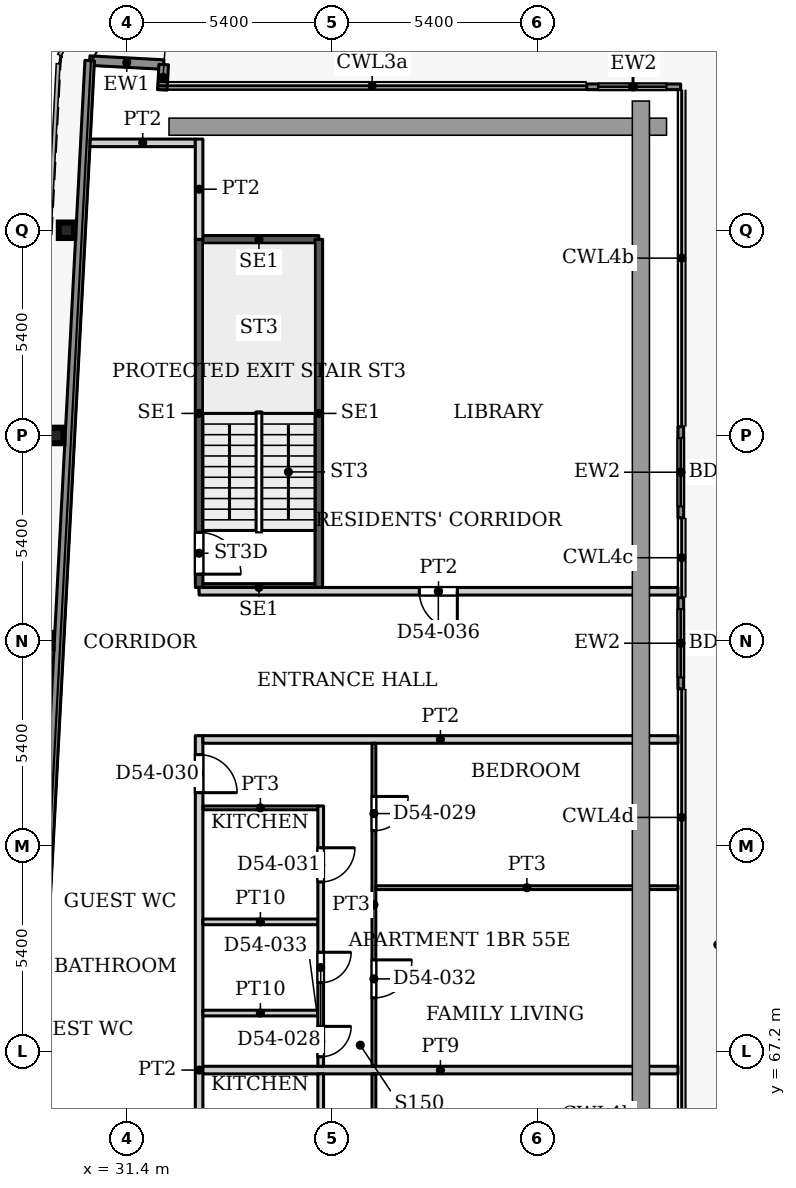
"""IFC4 building model, lengths in metres.
Left out: names, types, materials, properties, quantities, classifications, styles, units other than length and angle.
Written with IfcOpenShell. Run it as: python <this file> out.ifc"""

import sys

from ifc_helpers import new_model, si_unit, direction, frame, frame_2d, origin, origin_2d, place, context, subcontext, project, spatial, rectangle, i_section, extrude, source, transform, mapped, element, fill, save


model = new_model("IFC4")
c1 = context("Model", 3, precision=1e-05, world=origin(), true_north=direction((0.0, 1.0)))
c2 = subcontext(c1, "Body", "Model", "MODEL_VIEW")
j1 = project(units=[si_unit("LENGTHUNIT", "METRE"), si_unit("PLANEANGLEUNIT", "RADIAN")], contexts=[c1])
p1 = place(None, origin())
s1 = spatial("IfcSite", under=j1, at=p1, CompositionType="ELEMENT")
p2 = place(p1, origin())
s2 = spatial("IfcBuilding", under=s1, at=p2, CompositionType="ELEMENT")
p3 = place(p2, frame((0.0, 0.0, 235.7)))
s3 = spatial("IfcBuildingStorey", under=s2, at=p3, CompositionType="ELEMENT", Elevation=235.7)
for number, where, z_axis, x_axis in (
    (1, (29.243, 78.0, 0.0), (0.0, 0.0, 1.0), (1.0, 0.0, 0.0)),
    (2, (29.527, 83.4, 0.0), (0.0, 0.0, 1.0), (1.0, 0.0, 0.0)),
    (3, (29.811, 88.8, 0.0), (0.0, 0.0, 1.0), (1.0, 0.0, 0.0)),
):
    element("IfcColumn", number, at=place(p3, frame(where, z_axis=z_axis, x_axis=x_axis)), inside=s3, PredefinedType="COLUMN", context=c2, shape_type="SweptSolid", body=[
        extrude(i_section(OverallWidth=0.404, OverallDepth=0.407, WebThickness=0.027, FlangeThickness=0.044, FilletRadius=0.012, at=origin_2d()), origin(), (0.0, 0.0, 1.0), 3.9),
    ])
p4 = place(p3, frame((30.421, 93.264, 0.0), z_axis=(0.0, 0.0, 1.0), x_axis=(0.998577785791, -0.053314216913, 0.0)))
e4 = element("IfcWall", 4, at=p4, inside=s3, PredefinedType="SOLIDWALL", context=c2, shape_type="SweptSolid", body=[
    extrude(rectangle(XDim=1.951, YDim=0.25, at=frame_2d((0.975, 0.0))), origin(), (0.0, 0.0, 1.0), 3.75),
])
p5 = place(p3, frame((32.369, 93.16, 0.0), z_axis=(0.0, 0.0, 1.0), x_axis=(-0.053729014033, -0.998555553312, 0.0)))
e5 = element("IfcWall", 5, at=p5, inside=s3, PredefinedType="SOLIDWALL", context=c2, shape_type="SweptSolid", body=[
    extrude(rectangle(XDim=0.668, YDim=0.25, at=frame_2d((0.334, 0.0))), origin(), (0.0, 0.0, 1.0), 3.75),
])
p6 = place(p3, frame((43.5, 92.575, 0.0), z_axis=(0.0, 0.0, 1.0), x_axis=(1.0, 0.0, 0.0)))
e6 = element("IfcWall", 6, at=p6, inside=s3, PredefinedType="SOLIDWALL", context=c2, shape_type="SweptSolid", body=[
    extrude(rectangle(XDim=2.471, YDim=0.15, at=frame_2d((1.235, 0.0))), origin(), (0.0, 0.0, 1.0), 3.75),
])
p7 = place(p6, frame((0.3, 0.0, 0.0)))
e7 = element("IfcOpeningElement", 7, at=p7, cuts=e6, PredefinedType="OPENING", context=c2, shape_type="SweptSolid", body=[
    extrude(rectangle(XDim=1.8, YDim=2.4, at=frame_2d((0.9, 1.2))), frame((0.0, 0.085, 0.0), z_axis=(0.0, -1.0, 0.0), x_axis=(1.0, 0.0, 0.0)), (0.0, 0.0, 1.0), 0.17),
])
p8 = place(p3, frame((45.975, 83.632, 0.0), z_axis=(0.0, 0.0, 1.0), x_axis=(0.0, -1.0, 0.0)))
e8 = element("IfcWall", 8, at=p8, inside=s3, PredefinedType="SOLIDWALL", context=c2, shape_type="SweptSolid", body=[
    extrude(rectangle(XDim=2.399, YDim=0.15, at=frame_2d((1.2, 0.0))), origin(), (0.0, 0.0, 1.0), 3.75),
])
p9 = place(p8, frame((0.3, 0.0, 0.0)))
e9 = element("IfcOpeningElement", 9, at=p9, cuts=e8, PredefinedType="OPENING", context=c2, shape_type="SweptSolid", body=[
    extrude(rectangle(XDim=1.8, YDim=2.4, at=frame_2d((0.9, 1.2))), frame((0.0, 0.085, 0.0), z_axis=(0.0, -1.0, 0.0), x_axis=(1.0, 0.0, 0.0)), (0.0, 0.0, 1.0), 0.17),
])
p10 = place(p3, frame((45.975, 79.132, 0.0), z_axis=(0.0, 0.0, 1.0), x_axis=(0.0, -1.0, 0.0)))
e10 = element("IfcWall", 10, at=p10, inside=s3, PredefinedType="SOLIDWALL", context=c2, shape_type="SweptSolid", body=[
    extrude(rectangle(XDim=2.399, YDim=0.15, at=frame_2d((1.2, 0.0))), origin(), (0.0, 0.0, 1.0), 3.75),
])
p11 = place(p10, frame((0.3, 0.0, 0.0)))
e11 = element("IfcOpeningElement", 11, at=p11, cuts=e10, PredefinedType="OPENING", context=c2, shape_type="SweptSolid", body=[
    extrude(rectangle(XDim=1.8, YDim=2.4, at=frame_2d((0.9, 1.2))), frame((0.0, 0.085, 0.0), z_axis=(0.0, -1.0, 0.0), x_axis=(1.0, 0.0, 0.0)), (0.0, 0.0, 1.0), 0.17),
])
p12 = place(p3, frame((27.195, 31.969, 0.0), z_axis=(0.0, 0.0, 1.0), x_axis=(0.052555284099, 0.998618016117, 0.0)))
e12 = element("IfcWall", 12, at=p12, inside=s3, PredefinedType="SOLIDWALL", context=c2, shape_type="SweptSolid", body=[
    extrude(rectangle(XDim=61.38, YDim=0.25, at=frame_2d((30.69, 0.0))), origin(), (0.0, 0.0, 1.0), 3.75),
])
for number, where, z_axis, x_axis in (
    (13, (33.3, 79.4, 0.0), (0.0, 0.0, 1.0), (1.0, 0.0, 0.0)),
    (14, (33.3, 88.56, 0.0), (0.0, 0.0, 1.0), (1.0, 0.0, 0.0)),
):
    element("IfcWall", number, at=place(p3, frame(where, z_axis=z_axis, x_axis=x_axis)), inside=s3, PredefinedType="SHEAR", context=c2, shape_type="SweptSolid", body=[
        extrude(rectangle(XDim=3.15, YDim=0.2, at=frame_2d((1.575, 0.0))), origin(), (0.0, 0.0, 1.0), 3.9),
    ])
p13 = place(p3, frame((33.3, 79.4, 0.0), z_axis=(0.0, 0.0, 1.0), x_axis=(0.0, 1.0, 0.0)))
e15 = element("IfcWall", 15, at=p13, inside=s3, PredefinedType="SHEAR", context=c2, shape_type="SweptSolid", body=[
    extrude(rectangle(XDim=9.16, YDim=0.2, at=frame_2d((4.58, 0.0))), origin(), (0.0, 0.0, 1.0), 3.9),
])
p14 = place(p13, frame((0.35, 0.0, 0.0)))
e16 = element("IfcOpeningElement", 16, at=p14, cuts=e15, PredefinedType="OPENING", context=c2, shape_type="SweptSolid", body=[
    extrude(rectangle(XDim=1.1, YDim=2.2, at=frame_2d((0.55, 1.1))), frame((0.0, 0.11, 0.0), z_axis=(0.0, -1.0, 0.0), x_axis=(1.0, 0.0, 0.0)), (0.0, 0.0, 1.0), 0.22),
])
p15 = place(p3, frame((36.45, 79.4, 0.0), z_axis=(0.0, 0.0, 1.0), x_axis=(0.0, 1.0, 0.0)))
e17 = element("IfcWall", 17, at=p15, inside=s3, PredefinedType="SHEAR", context=c2, shape_type="SweptSolid", body=[
    extrude(rectangle(XDim=9.16, YDim=0.2, at=frame_2d((4.58, 0.0))), origin(), (0.0, 0.0, 1.0), 3.9),
])
p16 = place(p3, frame((30.432, 91.1, 0.0), z_axis=(0.0, 0.0, 1.0), x_axis=(1.0, 0.0, 0.0)))
e18 = element("IfcWall", 18, at=p16, inside=s3, PredefinedType="PARTITIONING", context=c2, shape_type="SweptSolid", body=[
    extrude(rectangle(XDim=2.768, YDim=0.2, at=frame_2d((1.384, 0.0))), origin(), (0.0, 0.0, 1.0), 3.6),
])
p17 = place(p3, frame((33.3, 57.9, 0.0), z_axis=(0.0, 0.0, 1.0), x_axis=(0.0, 1.0, 0.0)))
e19 = element("IfcWall", 19, at=p17, inside=s3, PredefinedType="PARTITIONING", context=c2, shape_type="SweptSolid", body=[
    extrude(rectangle(XDim=17.6, YDim=0.2, at=frame_2d((8.8, 0.0))), origin(), (0.0, 0.0, 1.0), 3.6),
])
p18 = place(p17, frame((0.5, 0.0, 0.0)))
e20 = element("IfcOpeningElement", 20, at=p18, cuts=e19, PredefinedType="OPENING", context=c2, shape_type="SweptSolid", body=[
    extrude(rectangle(XDim=1.0, YDim=2.1, at=frame_2d((0.5, 1.05))), frame((0.0, 0.11, 0.0), z_axis=(0.0, -1.0, 0.0), x_axis=(1.0, 0.0, 0.0)), (0.0, 0.0, 1.0), 0.22),
])
p19 = place(p17, frame((16.1, 0.0, 0.0)))
e21 = element("IfcOpeningElement", 21, at=p19, cuts=e19, PredefinedType="OPENING", context=c2, shape_type="SweptSolid", body=[
    extrude(rectangle(XDim=1.0, YDim=2.1, at=frame_2d((0.5, 1.05))), frame((0.0, 0.11, 0.0), z_axis=(0.0, -1.0, 0.0), x_axis=(1.0, 0.0, 0.0)), (0.0, 0.0, 1.0), 0.22),
])
p20 = place(p3, frame((33.3, 79.3, 0.0), z_axis=(0.0, 0.0, 1.0), x_axis=(1.0, 0.0, 0.0)))
e22 = element("IfcWall", 22, at=p20, inside=s3, PredefinedType="PARTITIONING", context=c2, shape_type="SweptSolid", body=[
    extrude(rectangle(XDim=12.6, YDim=0.2, at=frame_2d((6.3, 0.0))), origin(), (0.0, 0.0, 1.0), 3.6),
])
p21 = place(p20, frame((5.795, 0.0, 0.0)))
e23 = element("IfcOpeningElement", 23, at=p21, cuts=e22, PredefinedType="OPENING", context=c2, shape_type="SweptSolid", body=[
    extrude(rectangle(XDim=1.0, YDim=2.1, at=frame_2d((0.5, 1.05))), frame((0.0, 0.11, 0.0), z_axis=(0.0, -1.0, 0.0), x_axis=(1.0, 0.0, 0.0)), (0.0, 0.0, 1.0), 0.22),
])
p22 = place(p3, frame((33.3, 88.56, 0.0), z_axis=(0.0, 0.0, 1.0), x_axis=(0.0, 1.0, 0.0)))
e24 = element("IfcWall", 24, at=p22, inside=s3, PredefinedType="PARTITIONING", context=c2, shape_type="SweptSolid", body=[
    extrude(rectangle(XDim=2.64, YDim=0.2, at=frame_2d((1.32, 0.0))), origin(), (0.0, 0.0, 1.0), 3.6),
])
p23 = place(p3, frame((33.4, 66.7, 0.0), z_axis=(0.0, 0.0, 1.0), x_axis=(1.0, 0.0, 0.0)))
e25 = element("IfcWall", 25, at=p23, inside=s3, PredefinedType="PARTITIONING", context=c2, shape_type="SweptSolid", body=[
    extrude(rectangle(XDim=12.5, YDim=0.2, at=frame_2d((6.25, 0.0))), origin(), (0.0, 0.0, 1.0), 3.6),
])
for number, where, z_axis, x_axis in (
    (26, (33.4, 68.2, 0.0), (0.0, 0.0, 1.0), (1.0, 0.0, 0.0)),
    (27, (33.4, 70.6, 0.0), (0.0, 0.0, 1.0), (1.0, 0.0, 0.0)),
):
    element("IfcWall", number, at=place(p3, frame(where, z_axis=z_axis, x_axis=x_axis)), inside=s3, PredefinedType="PARTITIONING", context=c2, shape_type="SweptSolid", body=[
        extrude(rectangle(XDim=3.025, YDim=0.15, at=frame_2d((1.513, 0.0))), origin(), (0.0, 0.0, 1.0), 3.6),
    ])
p24 = place(p3, frame((33.4, 73.6, 0.0), z_axis=(0.0, 0.0, 1.0), x_axis=(1.0, 0.0, 0.0)))
e28 = element("IfcWall", 28, at=p24, inside=s3, PredefinedType="PARTITIONING", context=c2, shape_type="SweptSolid", body=[
    extrude(rectangle(XDim=3.025, YDim=0.1, at=frame_2d((1.513, 0.0))), origin(), (0.0, 0.0, 1.0), 3.6),
])
p25 = place(p3, frame((33.4, 75.4, 0.0), z_axis=(0.0, 0.0, 1.0), x_axis=(1.0, 0.0, 0.0)))
e29 = element("IfcWall", 29, at=p25, inside=s3, PredefinedType="PARTITIONING", context=c2, shape_type="SweptSolid", body=[
    extrude(rectangle(XDim=12.5, YDim=0.2, at=frame_2d((6.25, 0.0))), origin(), (0.0, 0.0, 1.0), 3.6),
])
p26 = place(p3, frame((36.5, 59.725, 0.0), z_axis=(0.0, 0.0, 1.0), x_axis=(0.0, 1.0, 0.0)))
e30 = element("IfcWall", 30, at=p26, inside=s3, PredefinedType="PARTITIONING", context=c2, shape_type="SweptSolid", body=[
    extrude(rectangle(XDim=6.875, YDim=0.15, at=frame_2d((3.438, 0.0))), origin(), (0.0, 0.0, 1.0), 3.6),
])
p27 = place(p26, frame((0.875, 0.0, 0.0)))
e31 = element("IfcOpeningElement", 31, at=p27, cuts=e30, PredefinedType="OPENING", context=c2, shape_type="SweptSolid", body=[
    extrude(rectangle(XDim=0.8, YDim=2.1, at=frame_2d((0.4, 1.05))), frame((0.0, 0.085, 0.0), z_axis=(0.0, -1.0, 0.0), x_axis=(1.0, 0.0, 0.0)), (0.0, 0.0, 1.0), 0.17),
])
p28 = place(p26, frame((5.025, 0.0, 0.0)))
e32 = element("IfcOpeningElement", 32, at=p28, cuts=e30, PredefinedType="OPENING", context=c2, shape_type="SweptSolid", body=[
    extrude(rectangle(XDim=0.9, YDim=2.1, at=frame_2d((0.45, 1.05))), frame((0.0, 0.085, 0.0), z_axis=(0.0, -1.0, 0.0), x_axis=(1.0, 0.0, 0.0)), (0.0, 0.0, 1.0), 0.17),
])
p29 = place(p26, frame((2.825, 0.0, 0.0)))
e33 = element("IfcOpeningElement", 33, at=p29, cuts=e30, PredefinedType="OPENING", context=c2, shape_type="SweptSolid", body=[
    extrude(rectangle(XDim=0.8, YDim=2.1, at=frame_2d((0.4, 1.05))), frame((0.0, 0.085, 0.0), z_axis=(0.0, -1.0, 0.0), x_axis=(1.0, 0.0, 0.0)), (0.0, 0.0, 1.0), 0.17),
])
p30 = place(p3, frame((36.5, 66.8, 0.0), z_axis=(0.0, 0.0, 1.0), x_axis=(0.0, 1.0, 0.0)))
e34 = element("IfcWall", 34, at=p30, inside=s3, PredefinedType="PARTITIONING", context=c2, shape_type="SweptSolid", body=[
    extrude(rectangle(XDim=6.85, YDim=0.15, at=frame_2d((3.425, 0.0))), origin(), (0.0, 0.0, 1.0), 3.6),
])
p31 = place(p30, frame((2.2, 0.0, 0.0)))
e35 = element("IfcOpeningElement", 35, at=p31, cuts=e34, PredefinedType="OPENING", context=c2, shape_type="SweptSolid", body=[
    extrude(rectangle(XDim=0.8, YDim=2.1, at=frame_2d((0.4, 1.05))), frame((0.0, 0.085, 0.0), z_axis=(0.0, -1.0, 0.0), x_axis=(1.0, 0.0, 0.0)), (0.0, 0.0, 1.0), 0.17),
])
p32 = place(p30, frame((4.85, 0.0, 0.0)))
e36 = element("IfcOpeningElement", 36, at=p32, cuts=e34, PredefinedType="OPENING", context=c2, shape_type="SweptSolid", body=[
    extrude(rectangle(XDim=0.9, YDim=2.1, at=frame_2d((0.45, 1.05))), frame((0.0, 0.085, 0.0), z_axis=(0.0, -1.0, 0.0), x_axis=(1.0, 0.0, 0.0)), (0.0, 0.0, 1.0), 0.17),
])
p33 = place(p30, frame((0.25, 0.0, 0.0)))
e37 = element("IfcOpeningElement", 37, at=p33, cuts=e34, PredefinedType="OPENING", context=c2, shape_type="SweptSolid", body=[
    extrude(rectangle(XDim=0.8, YDim=2.1, at=frame_2d((0.4, 1.05))), frame((0.0, 0.085, 0.0), z_axis=(0.0, -1.0, 0.0), x_axis=(1.0, 0.0, 0.0)), (0.0, 0.0, 1.0), 0.17),
])
p34 = place(p3, frame((37.9, 58.1, 0.0), z_axis=(0.0, 0.0, 1.0), x_axis=(0.0, 1.0, 0.0)))
e38 = element("IfcWall", 38, at=p34, inside=s3, PredefinedType="PARTITIONING", context=c2, shape_type="SweptSolid", body=[
    extrude(rectangle(XDim=8.5, YDim=0.1, at=frame_2d((4.25, 0.0))), origin(), (0.0, 0.0, 1.0), 3.6),
])
p35 = place(p34, frame((1.4, 0.0, 0.0)))
e39 = element("IfcOpeningElement", 39, at=p35, cuts=e38, PredefinedType="OPENING", context=c2, shape_type="SweptSolid", body=[
    extrude(rectangle(XDim=0.9, YDim=2.1, at=frame_2d((0.45, 1.05))), frame((0.0, 0.06, 0.0), z_axis=(0.0, -1.0, 0.0), x_axis=(1.0, 0.0, 0.0)), (0.0, 0.0, 1.0), 0.12),
])
p36 = place(p34, frame((5.7, 0.0, 0.0)))
e40 = element("IfcOpeningElement", 40, at=p36, cuts=e38, PredefinedType="OPENING", context=c2, shape_type="SweptSolid", body=[
    extrude(rectangle(XDim=1.0, YDim=2.1, at=frame_2d((0.5, 1.05))), frame((0.0, 0.06, 0.0), z_axis=(0.0, -1.0, 0.0), x_axis=(1.0, 0.0, 0.0)), (0.0, 0.0, 1.0), 0.12),
])
p37 = place(p3, frame((37.9, 66.8, 0.0), z_axis=(0.0, 0.0, 1.0), x_axis=(0.0, 1.0, 0.0)))
e41 = element("IfcWall", 41, at=p37, inside=s3, PredefinedType="PARTITIONING", context=c2, shape_type="SweptSolid", body=[
    extrude(rectangle(XDim=8.5, YDim=0.1, at=frame_2d((4.25, 0.0))), origin(), (0.0, 0.0, 1.0), 3.6),
])
p38 = place(p37, frame((6.2, 0.0, 0.0)))
e42 = element("IfcOpeningElement", 42, at=p38, cuts=e41, PredefinedType="OPENING", context=c2, shape_type="SweptSolid", body=[
    extrude(rectangle(XDim=0.9, YDim=2.1, at=frame_2d((0.45, 1.05))), frame((0.0, 0.06, 0.0), z_axis=(0.0, -1.0, 0.0), x_axis=(1.0, 0.0, 0.0)), (0.0, 0.0, 1.0), 0.12),
])
p39 = place(p37, frame((1.8, 0.0, 0.0)))
e43 = element("IfcOpeningElement", 43, at=p39, cuts=e41, PredefinedType="OPENING", context=c2, shape_type="SweptSolid", body=[
    extrude(rectangle(XDim=1.0, YDim=2.1, at=frame_2d((0.5, 1.05))), frame((0.0, 0.06, 0.0), z_axis=(0.0, -1.0, 0.0), x_axis=(1.0, 0.0, 0.0)), (0.0, 0.0, 1.0), 0.12),
])
p40 = place(p3, frame((37.95, 71.5, 0.0), z_axis=(0.0, 0.0, 1.0), x_axis=(1.0, 0.0, 0.0)))
e44 = element("IfcWall", 44, at=p40, inside=s3, PredefinedType="PARTITIONING", context=c2, shape_type="SweptSolid", body=[
    extrude(rectangle(XDim=7.95, YDim=0.1, at=frame_2d((3.975, 0.0))), origin(), (0.0, 0.0, 1.0), 3.6),
])
m1 = source(origin(), c2, "Body", "SweptSolid", [
    extrude(rectangle(XDim=1.8, YDim=2.4, at=frame_2d((0.9, 1.2))), frame((0.0, 0.025, 0.0), z_axis=(0.0, -1.0, 0.0), x_axis=(1.0, 0.0, 0.0)), (0.0, 0.0, 1.0), 0.05),
])
p41 = place(p7, origin())
e45 = element("IfcDoor", 45, at=p41, inside=s3, OperationType="SLIDING_TO_LEFT", PredefinedType="DOOR", context=c2, shape_type="MappedRepresentation", body=[
    mapped(m1, transform((0.0, 0.0, 0.0), x_axis=(1.0, 0.0, 0.0), y_axis=(0.0, 1.0, 0.0), z_axis=(0.0, 0.0, 1.0), scale=1.0)),
])
fill(e7, e45)
p42 = place(p9, origin())
e46 = element("IfcDoor", 46, at=p42, inside=s3, OperationType="SLIDING_TO_LEFT", PredefinedType="DOOR", context=c2, shape_type="MappedRepresentation", body=[
    mapped(m1, transform((0.0, 0.0, 0.0), x_axis=(1.0, 0.0, 0.0), y_axis=(0.0, 1.0, 0.0), z_axis=(0.0, 0.0, 1.0), scale=1.0)),
])
fill(e9, e46)
p43 = place(p11, origin())
e47 = element("IfcDoor", 47, at=p43, inside=s3, OperationType="SLIDING_TO_LEFT", PredefinedType="DOOR", context=c2, shape_type="MappedRepresentation", body=[
    mapped(m1, transform((0.0, 0.0, 0.0), x_axis=(1.0, 0.0, 0.0), y_axis=(0.0, 1.0, 0.0), z_axis=(0.0, 0.0, 1.0), scale=1.0)),
])
fill(e11, e47)
m2 = source(origin(), c2, "Body", "SweptSolid", [
    extrude(rectangle(XDim=1.1, YDim=2.2, at=frame_2d((0.55, 1.1))), frame((0.0, 0.025, 0.0), z_axis=(0.0, -1.0, 0.0), x_axis=(1.0, 0.0, 0.0)), (0.0, 0.0, 1.0), 0.05),
])
p44 = place(p14, origin())
e48 = element("IfcDoor", 48, at=p44, inside=s3, OperationType="SINGLE_SWING_RIGHT", PredefinedType="DOOR", context=c2, shape_type="MappedRepresentation", body=[
    mapped(m2, transform((0.0, 0.0, 0.0), x_axis=(1.0, 0.0, 0.0), y_axis=(0.0, 1.0, 0.0), z_axis=(0.0, 0.0, 1.0), scale=1.0)),
])
fill(e16, e48)
m3 = source(origin(), c2, "Body", "SweptSolid", [
    extrude(rectangle(XDim=0.8, YDim=2.1, at=frame_2d((0.4, 1.05))), frame((0.0, 0.025, 0.0), z_axis=(0.0, -1.0, 0.0), x_axis=(1.0, 0.0, 0.0)), (0.0, 0.0, 1.0), 0.05),
])
p45 = place(p31, origin())
e49 = element("IfcDoor", 49, at=p45, inside=s3, OperationType="SINGLE_SWING_RIGHT", PredefinedType="DOOR", context=c2, shape_type="MappedRepresentation", body=[
    mapped(m3, transform((0.0, 0.0, 0.0), x_axis=(1.0, 0.0, 0.0), y_axis=(0.0, 1.0, 0.0), z_axis=(0.0, 0.0, 1.0), scale=1.0)),
])
fill(e35, e49)
m4 = source(origin(), c2, "Body", "SweptSolid", [
    extrude(rectangle(XDim=0.9, YDim=2.1, at=frame_2d((0.45, 1.05))), frame((0.0, 0.025, 0.0), z_axis=(0.0, -1.0, 0.0), x_axis=(1.0, 0.0, 0.0)), (0.0, 0.0, 1.0), 0.05),
])
p46 = place(p38, origin())
e50 = element("IfcDoor", 50, at=p46, inside=s3, OperationType="SINGLE_SWING_RIGHT", PredefinedType="DOOR", context=c2, shape_type="MappedRepresentation", body=[
    mapped(m4, transform((0.0, 0.0, 0.0), x_axis=(1.0, 0.0, 0.0), y_axis=(0.0, 1.0, 0.0), z_axis=(0.0, 0.0, 1.0), scale=1.0)),
])
fill(e42, e50)
m5 = source(origin(), c2, "Body", "SweptSolid", [
    extrude(rectangle(XDim=1.0, YDim=2.1, at=frame_2d((0.5, 1.05))), frame((0.0, 0.025, 0.0), z_axis=(0.0, -1.0, 0.0), x_axis=(1.0, 0.0, 0.0)), (0.0, 0.0, 1.0), 0.05),
])
p47 = place(p19, origin())
e51 = element("IfcDoor", 51, at=p47, inside=s3, OperationType="SINGLE_SWING_RIGHT", PredefinedType="DOOR", context=c2, shape_type="MappedRepresentation", body=[
    mapped(m5, transform((0.0, 0.0, 0.0), x_axis=(1.0, 0.0, 0.0), y_axis=(0.0, 1.0, 0.0), z_axis=(0.0, 0.0, 1.0), scale=1.0)),
])
fill(e21, e51)
p48 = place(p32, origin())
e52 = element("IfcDoor", 52, at=p48, inside=s3, OperationType="SINGLE_SWING_RIGHT", PredefinedType="DOOR", context=c2, shape_type="MappedRepresentation", body=[
    mapped(m4, transform((0.0, 0.0, 0.0), x_axis=(1.0, 0.0, 0.0), y_axis=(0.0, 1.0, 0.0), z_axis=(0.0, 0.0, 1.0), scale=1.0)),
])
fill(e36, e52)
m6 = source(origin(), c2, "Body", "SweptSolid", [
    extrude(rectangle(XDim=1.0, YDim=2.1, at=frame_2d((0.5, 1.05))), frame((0.0, 0.025, 0.0), z_axis=(0.0, -1.0, 0.0), x_axis=(1.0, 0.0, 0.0)), (0.0, 0.0, 1.0), 0.05),
])
p49 = place(p39, origin())
e53 = element("IfcDoor", 53, at=p49, inside=s3, OperationType="SINGLE_SWING_RIGHT", PredefinedType="DOOR", context=c2, shape_type="MappedRepresentation", body=[
    mapped(m6, transform((0.0, 0.0, 0.0), x_axis=(1.0, 0.0, 0.0), y_axis=(0.0, 1.0, 0.0), z_axis=(0.0, 0.0, 1.0), scale=1.0)),
])
fill(e43, e53)
p50 = place(p33, origin())
e54 = element("IfcDoor", 54, at=p50, inside=s3, OperationType="SINGLE_SWING_RIGHT", PredefinedType="DOOR", context=c2, shape_type="MappedRepresentation", body=[
    mapped(m3, transform((0.0, 0.0, 0.0), x_axis=(1.0, 0.0, 0.0), y_axis=(0.0, 1.0, 0.0), z_axis=(0.0, 0.0, 1.0), scale=1.0)),
])
fill(e37, e54)
m7 = source(origin(), c2, "Body", "SweptSolid", [
    extrude(rectangle(XDim=1.0, YDim=2.1, at=frame_2d((0.5, 1.05))), frame((0.0, 0.025, 0.0), z_axis=(0.0, -1.0, 0.0), x_axis=(1.0, 0.0, 0.0)), (0.0, 0.0, 1.0), 0.05),
])
p51 = place(p21, origin())
e55 = element("IfcDoor", 55, at=p51, inside=s3, OperationType="SINGLE_SWING_RIGHT", PredefinedType="DOOR", context=c2, shape_type="MappedRepresentation", body=[
    mapped(m7, transform((0.0, 0.0, 0.0), x_axis=(1.0, 0.0, 0.0), y_axis=(0.0, 1.0, 0.0), z_axis=(0.0, 0.0, 1.0), scale=1.0)),
])
fill(e23, e55)
save(model, sys.argv[1])
